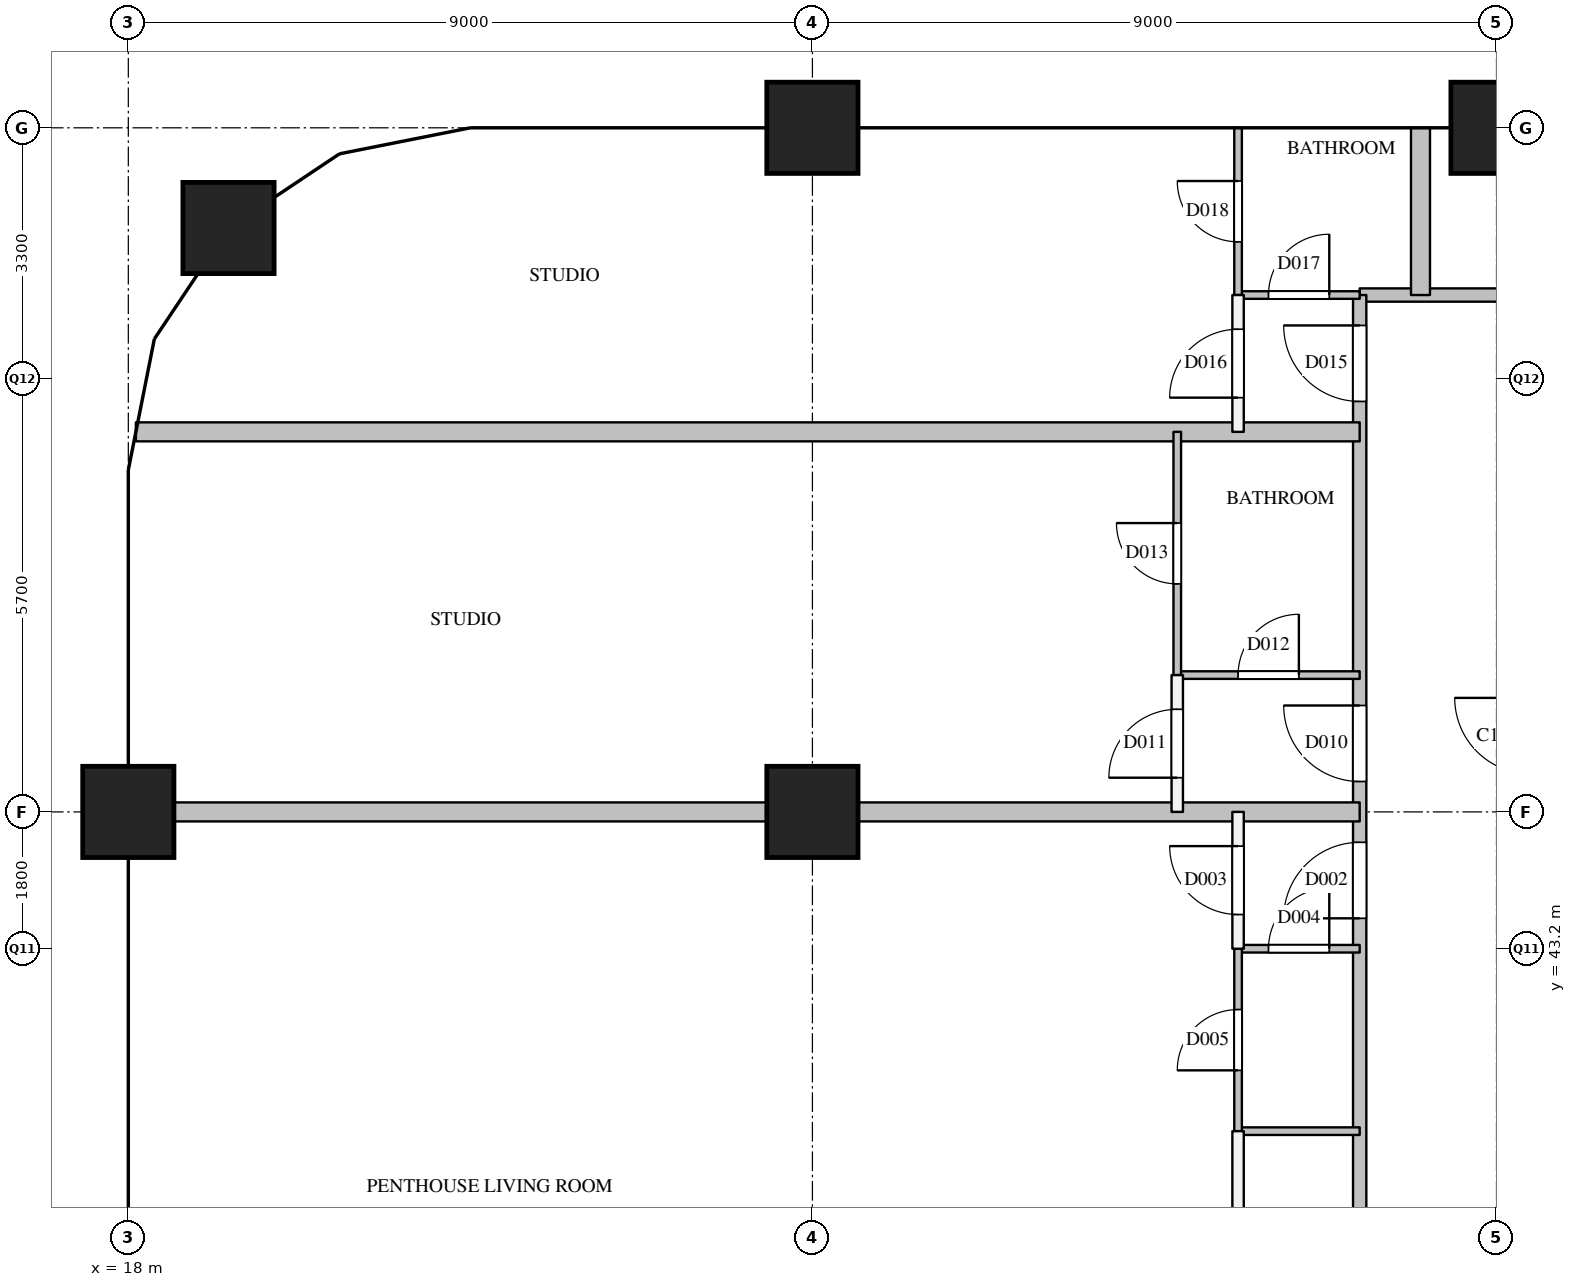
"""IFC4 building model, lengths in metres.
Left out: names, types, materials, properties, quantities, classifications, styles, units other than length and angle.
Written with IfcOpenShell. Run it as: python <this file> out.ifc"""

import sys

from ifc_helpers import new_model, si_unit, direction, frame, frame_2d, origin, origin_2d, place, context, subcontext, project, spatial, rectangle, extrude, element, fill, save


model = new_model("IFC4")
c1 = context("Model", 3, precision=1e-05, world=origin(), true_north=direction((0.0, 1.0)))
c2 = subcontext(c1, "Body", "Model", "MODEL_VIEW")
j1 = project(units=[si_unit("LENGTHUNIT", "METRE"), si_unit("PLANEANGLEUNIT", "RADIAN")], contexts=[c1])
p1 = place(None, origin())
s1 = spatial("IfcSite", under=j1, at=p1, CompositionType="ELEMENT")
p2 = place(p1, origin())
s2 = spatial("IfcBuilding", under=s1, at=p2, CompositionType="ELEMENT")
p3 = place(p2, frame((0.0, 0.0, 301.2)))
s3 = spatial("IfcBuildingStorey", under=s2, at=p3, CompositionType="ELEMENT", Elevation=301.2)
for number, where, z_axis, x_axis in (
    (1, (18.0, 45.0, 0.0), (0.0, 0.0, 1.0), (1.0, 0.0, 0.0)),
    (2, (19.318, 52.682, 0.0), (0.0, 0.0, 1.0), (1.0, 0.0, 0.0)),
    (3, (27.0, 45.0, 0.0), (0.0, 0.0, 1.0), (1.0, 0.0, 0.0)),
    (4, (27.0, 54.0, 0.0), (0.0, 0.0, 1.0), (1.0, 0.0, 0.0)),
    (5, (36.0, 54.0, 0.0), (0.0, 0.0, 1.0), (1.0, 0.0, 0.0)),
):
    element("IfcColumn", number, at=place(p3, frame(where, z_axis=z_axis, x_axis=x_axis)), inside=s3, PredefinedType="COLUMN", context=c2, shape_type="SweptSolid", body=[
        extrude(rectangle(XDim=1.2, YDim=1.2, at=origin_2d()), origin(), (0.0, 0.0, 1.0), 3.9),
    ])
p4 = place(p3, frame((34.2, 51.8, 0.0), z_axis=(0.0, 0.0, 1.0), x_axis=(1.0, 0.0, 0.0)))
e6 = element("IfcWall", 6, at=p4, inside=s3, PredefinedType="PARTITIONING", context=c2, shape_type="SweptSolid", body=[
    extrude(rectangle(XDim=16.0, YDim=0.175, at=frame_2d((8.0, 0.0))), origin(), (0.0, 0.0, 1.0), 3.6),
])
p5 = place(p4, frame((6.757, 0.0, 0.0)))
e7 = element("IfcOpeningElement", 7, at=p5, cuts=e6, PredefinedType="OPENING", context=c2, shape_type="SweptSolid", body=[
    extrude(rectangle(XDim=1.0, YDim=2.1, at=frame_2d((0.5, 1.05))), frame((0.0, 0.097, 0.0), z_axis=(0.0, -1.0, 0.0), x_axis=(1.0, 0.0, 0.0)), (0.0, 0.0, 1.0), 0.195),
])
p6 = place(p3, frame((34.2, 28.5, 0.0), z_axis=(0.0, 0.0, 1.0), x_axis=(0.0, 1.0, 0.0)))
e8 = element("IfcWall", 8, at=p6, inside=s3, PredefinedType="PARTITIONING", context=c2, shape_type="SweptSolid", body=[
    extrude(rectangle(XDim=23.3, YDim=0.175, at=frame_2d((11.65, 0.0))), origin(), (0.0, 0.0, 1.0), 3.6),
])
p7 = place(p6, frame((15.1, 0.0, 0.0)))
e9 = element("IfcOpeningElement", 9, at=p7, cuts=e8, PredefinedType="OPENING", context=c2, shape_type="SweptSolid", body=[
    extrude(rectangle(XDim=1.0, YDim=2.1, at=frame_2d((0.5, 1.05))), frame((0.0, 0.097, 0.0), z_axis=(0.0, -1.0, 0.0), x_axis=(1.0, 0.0, 0.0)), (0.0, 0.0, 1.0), 0.195),
])
p8 = place(p6, frame((16.9, 0.0, 0.0)))
e10 = element("IfcOpeningElement", 10, at=p8, cuts=e8, PredefinedType="OPENING", context=c2, shape_type="SweptSolid", body=[
    extrude(rectangle(XDim=1.0, YDim=2.1, at=frame_2d((0.5, 1.05))), frame((0.0, 0.097, 0.0), z_axis=(0.0, -1.0, 0.0), x_axis=(1.0, 0.0, 0.0)), (0.0, 0.0, 1.0), 0.195),
])
p9 = place(p6, frame((21.9, 0.0, 0.0)))
e11 = element("IfcOpeningElement", 11, at=p9, cuts=e8, PredefinedType="OPENING", context=c2, shape_type="SweptSolid", body=[
    extrude(rectangle(XDim=1.0, YDim=2.1, at=frame_2d((0.5, 1.05))), frame((0.0, 0.097, 0.0), z_axis=(0.0, -1.0, 0.0), x_axis=(1.0, 0.0, 0.0)), (0.0, 0.0, 1.0), 0.195),
])
p10 = place(p3, frame((31.8, 45.0, 0.0), z_axis=(0.0, 0.0, 1.0), x_axis=(0.0, 1.0, 0.0)))
e12 = element("IfcWall", 12, at=p10, inside=s3, PredefinedType="PARTITIONING", context=c2, shape_type="SweptSolid", body=[
    extrude(rectangle(XDim=1.8, YDim=0.15, at=frame_2d((0.9, 0.0))), origin(), (0.0, 0.0, 1.0), 3.6),
])
p11 = place(p10, frame((0.45, 0.0, 0.0)))
e13 = element("IfcOpeningElement", 13, at=p11, cuts=e12, PredefinedType="OPENING", context=c2, shape_type="SweptSolid", body=[
    extrude(rectangle(XDim=0.9, YDim=2.1, at=frame_2d((0.45, 1.05))), frame((0.0, 0.085, 0.0), z_axis=(0.0, -1.0, 0.0), x_axis=(1.0, 0.0, 0.0)), (0.0, 0.0, 1.0), 0.17),
])
p12 = place(p3, frame((32.6, 27.0, 0.0), z_axis=(0.0, 0.0, 1.0), x_axis=(0.0, 1.0, 0.0)))
e14 = element("IfcWall", 14, at=p12, inside=s3, PredefinedType="PARTITIONING", context=c2, shape_type="SweptSolid", body=[
    extrude(rectangle(XDim=13.8, YDim=0.15, at=frame_2d((6.9, 0.0))), origin(), (0.0, 0.0, 1.0), 2.6),
])
p13 = place(p12, frame((10.45, 0.0, 0.0)))
e15 = element("IfcOpeningElement", 15, at=p13, cuts=e14, PredefinedType="OPENING", context=c2, shape_type="SweptSolid", body=[
    extrude(rectangle(XDim=0.9, YDim=2.1, at=frame_2d((0.45, 1.05))), frame((0.0, 0.085, 0.0), z_axis=(0.0, -1.0, 0.0), x_axis=(1.0, 0.0, 0.0)), (0.0, 0.0, 1.0), 0.17),
])
p14 = place(p3, frame((32.6, 43.2, 0.0), z_axis=(0.0, 0.0, 1.0), x_axis=(0.0, 1.0, 0.0)))
e16 = element("IfcWall", 16, at=p14, inside=s3, PredefinedType="PARTITIONING", context=c2, shape_type="SweptSolid", body=[
    extrude(rectangle(XDim=1.8, YDim=0.15, at=frame_2d((0.9, 0.0))), origin(), (0.0, 0.0, 1.0), 3.6),
])
p15 = place(p14, frame((0.45, 0.0, 0.0)))
e17 = element("IfcOpeningElement", 17, at=p15, cuts=e16, PredefinedType="OPENING", context=c2, shape_type="SweptSolid", body=[
    extrude(rectangle(XDim=0.9, YDim=2.1, at=frame_2d((0.45, 1.05))), frame((0.0, 0.085, 0.0), z_axis=(0.0, -1.0, 0.0), x_axis=(1.0, 0.0, 0.0)), (0.0, 0.0, 1.0), 0.17),
])
p16 = place(p3, frame((32.6, 50.0, 0.0), z_axis=(0.0, 0.0, 1.0), x_axis=(0.0, 1.0, 0.0)))
e18 = element("IfcWall", 18, at=p16, inside=s3, PredefinedType="PARTITIONING", context=c2, shape_type="SweptSolid", body=[
    extrude(rectangle(XDim=1.8, YDim=0.15, at=frame_2d((0.9, 0.0))), origin(), (0.0, 0.0, 1.0), 3.6),
])
p17 = place(p16, frame((0.45, 0.0, 0.0)))
e19 = element("IfcOpeningElement", 19, at=p17, cuts=e18, PredefinedType="OPENING", context=c2, shape_type="SweptSolid", body=[
    extrude(rectangle(XDim=0.9, YDim=2.1, at=frame_2d((0.45, 1.05))), frame((0.0, 0.085, 0.0), z_axis=(0.0, -1.0, 0.0), x_axis=(1.0, 0.0, 0.0)), (0.0, 0.0, 1.0), 0.17),
])
p18 = place(p3, frame((18.0, 45.0, 0.0), z_axis=(0.0, 0.0, 1.0), x_axis=(1.0, 0.0, 0.0)))
e20 = element("IfcWall", 20, at=p18, inside=s3, PredefinedType="PARTITIONING", context=c2, shape_type="SweptSolid", body=[
    extrude(rectangle(XDim=16.2, YDim=0.25, at=frame_2d((8.1, 0.0))), origin(), (0.0, 0.0, 1.0), 3.6),
])
p19 = place(p3, frame((18.1, 50.0, 0.0), z_axis=(0.0, 0.0, 1.0), x_axis=(1.0, 0.0, 0.0)))
e21 = element("IfcWall", 21, at=p19, inside=s3, PredefinedType="PARTITIONING", context=c2, shape_type="SweptSolid", body=[
    extrude(rectangle(XDim=16.1, YDim=0.25, at=frame_2d((8.05, 0.0))), origin(), (0.0, 0.0, 1.0), 2.6),
])
p20 = place(p3, frame((35.0, 51.8, 0.0), z_axis=(0.0, 0.0, 1.0), x_axis=(0.0, 1.0, 0.0)))
e22 = element("IfcWall", 22, at=p20, inside=s3, PredefinedType="PARTITIONING", context=c2, shape_type="SweptSolid", body=[
    extrude(rectangle(XDim=2.2, YDim=0.25, at=frame_2d((1.1, 0.0))), origin(), (0.0, 0.0, 1.0), 2.6),
])
p21 = place(p3, frame((32.6, 40.8, 0.0), z_axis=(0.0, 0.0, 1.0), x_axis=(1.0, 0.0, 0.0)))
e23 = element("IfcWall", 23, at=p21, inside=s3, PredefinedType="PARTITIONING", context=c2, shape_type="SweptSolid", body=[
    extrude(rectangle(XDim=1.6, YDim=0.1, at=frame_2d((0.8, 0.0))), origin(), (0.0, 0.0, 1.0), 3.6),
])
p22 = place(p3, frame((32.6, 43.2, 0.0), z_axis=(0.0, 0.0, 1.0), x_axis=(1.0, 0.0, 0.0)))
e24 = element("IfcWall", 24, at=p22, inside=s3, PredefinedType="PARTITIONING", context=c2, shape_type="SweptSolid", body=[
    extrude(rectangle(XDim=1.6, YDim=0.1, at=frame_2d((0.8, 0.0))), origin(), (0.0, 0.0, 1.0), 3.6),
])
p23 = place(p22, frame((0.4, 0.0, 0.0)))
e25 = element("IfcOpeningElement", 25, at=p23, cuts=e24, PredefinedType="OPENING", context=c2, shape_type="SweptSolid", body=[
    extrude(rectangle(XDim=0.8, YDim=2.1, at=frame_2d((0.4, 1.05))), frame((0.0, 0.06, 0.0), z_axis=(0.0, -1.0, 0.0), x_axis=(1.0, 0.0, 0.0)), (0.0, 0.0, 1.0), 0.12),
])
p24 = place(p3, frame((31.8, 46.8, 0.0), z_axis=(0.0, 0.0, 1.0), x_axis=(1.0, 0.0, 0.0)))
e26 = element("IfcWall", 26, at=p24, inside=s3, PredefinedType="PARTITIONING", context=c2, shape_type="SweptSolid", body=[
    extrude(rectangle(XDim=2.4, YDim=0.1, at=frame_2d((1.2, 0.0))), origin(), (0.0, 0.0, 1.0), 3.6),
])
p25 = place(p24, frame((0.8, 0.0, 0.0)))
e27 = element("IfcOpeningElement", 27, at=p25, cuts=e26, PredefinedType="OPENING", context=c2, shape_type="SweptSolid", body=[
    extrude(rectangle(XDim=0.8, YDim=2.1, at=frame_2d((0.4, 1.05))), frame((0.0, 0.06, 0.0), z_axis=(0.0, -1.0, 0.0), x_axis=(1.0, 0.0, 0.0)), (0.0, 0.0, 1.0), 0.12),
])
p26 = place(p3, frame((32.6, 51.8, 0.0), z_axis=(0.0, 0.0, 1.0), x_axis=(1.0, 0.0, 0.0)))
e28 = element("IfcWall", 28, at=p26, inside=s3, PredefinedType="PARTITIONING", context=c2, shape_type="SweptSolid", body=[
    extrude(rectangle(XDim=1.6, YDim=0.1, at=frame_2d((0.8, 0.0))), origin(), (0.0, 0.0, 1.0), 3.6),
])
p27 = place(p26, frame((0.4, 0.0, 0.0)))
e29 = element("IfcOpeningElement", 29, at=p27, cuts=e28, PredefinedType="OPENING", context=c2, shape_type="SweptSolid", body=[
    extrude(rectangle(XDim=0.8, YDim=2.1, at=frame_2d((0.4, 1.05))), frame((0.0, 0.06, 0.0), z_axis=(0.0, -1.0, 0.0), x_axis=(1.0, 0.0, 0.0)), (0.0, 0.0, 1.0), 0.12),
])
p28 = place(p3, frame((31.8, 46.8, 0.0), z_axis=(0.0, 0.0, 1.0), x_axis=(0.0, 1.0, 0.0)))
e30 = element("IfcWall", 30, at=p28, inside=s3, PredefinedType="PARTITIONING", context=c2, shape_type="SweptSolid", body=[
    extrude(rectangle(XDim=3.2, YDim=0.1, at=frame_2d((1.6, 0.0))), origin(), (0.0, 0.0, 1.0), 3.6),
])
p29 = place(p28, frame((1.2, 0.0, 0.0)))
e31 = element("IfcOpeningElement", 31, at=p29, cuts=e30, PredefinedType="OPENING", context=c2, shape_type="SweptSolid", body=[
    extrude(rectangle(XDim=0.8, YDim=2.1, at=frame_2d((0.4, 1.05))), frame((0.0, 0.06, 0.0), z_axis=(0.0, -1.0, 0.0), x_axis=(1.0, 0.0, 0.0)), (0.0, 0.0, 1.0), 0.12),
])
p30 = place(p3, frame((32.6, 40.8, 0.0), z_axis=(0.0, 0.0, 1.0), x_axis=(0.0, 1.0, 0.0)))
e32 = element("IfcWall", 32, at=p30, inside=s3, PredefinedType="PARTITIONING", context=c2, shape_type="SweptSolid", body=[
    extrude(rectangle(XDim=2.4, YDim=0.1, at=frame_2d((1.2, 0.0))), origin(), (0.0, 0.0, 1.0), 3.6),
])
p31 = place(p30, frame((0.8, 0.0, 0.0)))
e33 = element("IfcOpeningElement", 33, at=p31, cuts=e32, PredefinedType="OPENING", context=c2, shape_type="SweptSolid", body=[
    extrude(rectangle(XDim=0.8, YDim=2.1, at=frame_2d((0.4, 1.05))), frame((0.0, 0.06, 0.0), z_axis=(0.0, -1.0, 0.0), x_axis=(1.0, 0.0, 0.0)), (0.0, 0.0, 1.0), 0.12),
])
p32 = place(p3, frame((32.6, 51.8, 0.0), z_axis=(0.0, 0.0, 1.0), x_axis=(0.0, 1.0, 0.0)))
e34 = element("IfcWall", 34, at=p32, inside=s3, PredefinedType="PARTITIONING", context=c2, shape_type="SweptSolid", body=[
    extrude(rectangle(XDim=2.2, YDim=0.1, at=frame_2d((1.1, 0.0))), origin(), (0.0, 0.0, 1.0), 2.6),
])
p33 = place(p32, frame((0.7, 0.0, 0.0)))
e35 = element("IfcOpeningElement", 35, at=p33, cuts=e34, PredefinedType="OPENING", context=c2, shape_type="SweptSolid", body=[
    extrude(rectangle(XDim=0.8, YDim=2.1, at=frame_2d((0.4, 1.05))), frame((0.0, 0.06, 0.0), z_axis=(0.0, -1.0, 0.0), x_axis=(1.0, 0.0, 0.0)), (0.0, 0.0, 1.0), 0.12),
])
p34 = place(p7, origin())
e36 = element("IfcDoor", 36, at=p34, inside=s3, OperationType="SINGLE_SWING_LEFT", PredefinedType="DOOR", context=c2, shape_type="SweptSolid", body=[
    extrude(rectangle(XDim=1.0, YDim=2.1, at=frame_2d((0.5, 1.05))), frame((0.0, 0.025, 0.0), z_axis=(0.0, -1.0, 0.0), x_axis=(1.0, 0.0, 0.0)), (0.0, 0.0, 1.0), 0.05),
])
fill(e9, e36)
p35 = place(p15, origin())
e37 = element("IfcDoor", 37, at=p35, inside=s3, OperationType="SINGLE_SWING_RIGHT", PredefinedType="DOOR", context=c2, shape_type="SweptSolid", body=[
    extrude(rectangle(XDim=0.9, YDim=2.1, at=frame_2d((0.45, 1.05))), frame((0.0, 0.025, 0.0), z_axis=(0.0, -1.0, 0.0), x_axis=(1.0, 0.0, 0.0)), (0.0, 0.0, 1.0), 0.05),
])
fill(e17, e37)
p36 = place(p23, origin())
e38 = element("IfcDoor", 38, at=p36, inside=s3, OperationType="SINGLE_SWING_RIGHT", PredefinedType="DOOR", context=c2, shape_type="SweptSolid", body=[
    extrude(rectangle(XDim=0.8, YDim=2.1, at=frame_2d((0.4, 1.05))), frame((0.0, 0.025, 0.0), z_axis=(0.0, -1.0, 0.0), x_axis=(1.0, 0.0, 0.0)), (0.0, 0.0, 1.0), 0.05),
])
fill(e25, e38)
p37 = place(p31, origin())
e39 = element("IfcDoor", 39, at=p37, inside=s3, OperationType="SINGLE_SWING_LEFT", PredefinedType="DOOR", context=c2, shape_type="SweptSolid", body=[
    extrude(rectangle(XDim=0.8, YDim=2.1, at=frame_2d((0.4, 1.05))), frame((0.0, 0.025, 0.0), z_axis=(0.0, -1.0, 0.0), x_axis=(1.0, 0.0, 0.0)), (0.0, 0.0, 1.0), 0.05),
])
fill(e33, e39)
p38 = place(p8, origin())
e40 = element("IfcDoor", 40, at=p38, inside=s3, OperationType="SINGLE_SWING_RIGHT", PredefinedType="DOOR", context=c2, shape_type="SweptSolid", body=[
    extrude(rectangle(XDim=1.0, YDim=2.1, at=frame_2d((0.5, 1.05))), frame((0.0, 0.025, 0.0), z_axis=(0.0, -1.0, 0.0), x_axis=(1.0, 0.0, 0.0)), (0.0, 0.0, 1.0), 0.05),
])
fill(e10, e40)
p39 = place(p11, origin())
e41 = element("IfcDoor", 41, at=p39, inside=s3, OperationType="SINGLE_SWING_LEFT", PredefinedType="DOOR", context=c2, shape_type="SweptSolid", body=[
    extrude(rectangle(XDim=0.9, YDim=2.1, at=frame_2d((0.45, 1.05))), frame((0.0, 0.025, 0.0), z_axis=(0.0, -1.0, 0.0), x_axis=(1.0, 0.0, 0.0)), (0.0, 0.0, 1.0), 0.05),
])
fill(e13, e41)
p40 = place(p25, origin())
e42 = element("IfcDoor", 42, at=p40, inside=s3, OperationType="SINGLE_SWING_RIGHT", PredefinedType="DOOR", context=c2, shape_type="SweptSolid", body=[
    extrude(rectangle(XDim=0.8, YDim=2.1, at=frame_2d((0.4, 1.05))), frame((0.0, 0.025, 0.0), z_axis=(0.0, -1.0, 0.0), x_axis=(1.0, 0.0, 0.0)), (0.0, 0.0, 1.0), 0.05),
])
fill(e27, e42)
p41 = place(p29, origin())
e43 = element("IfcDoor", 43, at=p41, inside=s3, OperationType="SINGLE_SWING_RIGHT", PredefinedType="DOOR", context=c2, shape_type="SweptSolid", body=[
    extrude(rectangle(XDim=0.8, YDim=2.1, at=frame_2d((0.4, 1.05))), frame((0.0, 0.025, 0.0), z_axis=(0.0, -1.0, 0.0), x_axis=(1.0, 0.0, 0.0)), (0.0, 0.0, 1.0), 0.05),
])
fill(e31, e43)
p42 = place(p9, origin())
e44 = element("IfcDoor", 44, at=p42, inside=s3, OperationType="SINGLE_SWING_RIGHT", PredefinedType="DOOR", context=c2, shape_type="SweptSolid", body=[
    extrude(rectangle(XDim=1.0, YDim=2.1, at=frame_2d((0.5, 1.05))), frame((0.0, 0.025, 0.0), z_axis=(0.0, -1.0, 0.0), x_axis=(1.0, 0.0, 0.0)), (0.0, 0.0, 1.0), 0.05),
])
fill(e11, e44)
p43 = place(p17, origin())
e45 = element("IfcDoor", 45, at=p43, inside=s3, OperationType="SINGLE_SWING_LEFT", PredefinedType="DOOR", context=c2, shape_type="SweptSolid", body=[
    extrude(rectangle(XDim=0.9, YDim=2.1, at=frame_2d((0.45, 1.05))), frame((0.0, 0.025, 0.0), z_axis=(0.0, -1.0, 0.0), x_axis=(1.0, 0.0, 0.0)), (0.0, 0.0, 1.0), 0.05),
])
fill(e19, e45)
p44 = place(p27, origin())
e46 = element("IfcDoor", 46, at=p44, inside=s3, OperationType="SINGLE_SWING_RIGHT", PredefinedType="DOOR", context=c2, shape_type="SweptSolid", body=[
    extrude(rectangle(XDim=0.8, YDim=2.1, at=frame_2d((0.4, 1.05))), frame((0.0, 0.025, 0.0), z_axis=(0.0, -1.0, 0.0), x_axis=(1.0, 0.0, 0.0)), (0.0, 0.0, 1.0), 0.05),
])
fill(e29, e46)
p45 = place(p33, origin())
e47 = element("IfcDoor", 47, at=p45, inside=s3, OperationType="SINGLE_SWING_RIGHT", PredefinedType="DOOR", context=c2, shape_type="SweptSolid", body=[
    extrude(rectangle(XDim=0.8, YDim=2.1, at=frame_2d((0.4, 1.05))), frame((0.0, 0.025, 0.0), z_axis=(0.0, -1.0, 0.0), x_axis=(1.0, 0.0, 0.0)), (0.0, 0.0, 1.0), 0.05),
])
fill(e35, e47)
save(model, sys.argv[1])
